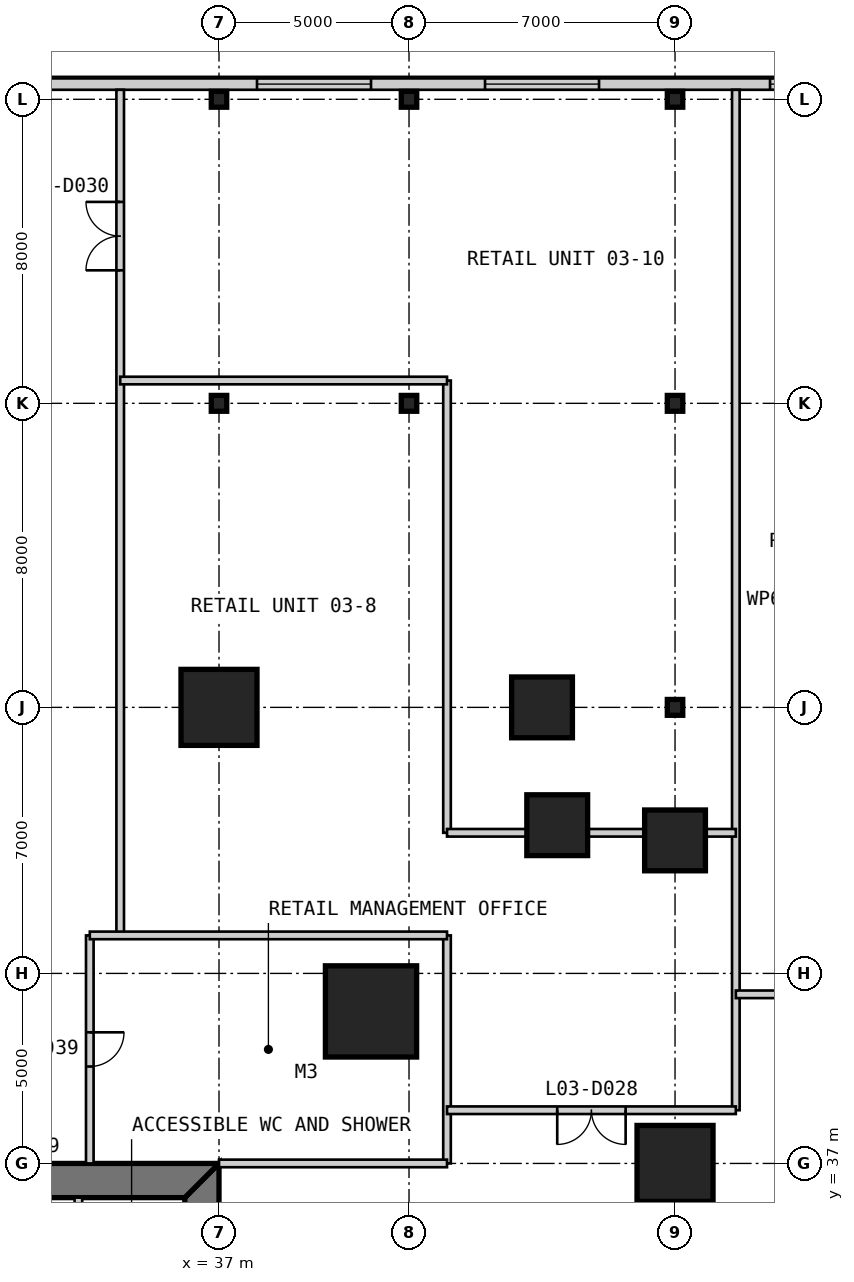
"""IFC4 building model, lengths in metres.
Left out: names, types, materials, properties, quantities, classifications, styles, units other than length and angle.
Written with IfcOpenShell. Run it as: python <this file> out.ifc"""

import sys

from ifc_helpers import new_model, si_unit, direction, frame, frame_2d, origin, origin_2d, place, context, subcontext, project, spatial, polyline, rectangle, i_section, outline, extrude, element, fill, save


model = new_model("IFC4")
c1 = context("Model", 3, precision=1e-05, world=origin(), true_north=direction((0.0, 1.0)))
c2 = subcontext(c1, "Body", "Model", "MODEL_VIEW")
j1 = project(units=[si_unit("LENGTHUNIT", "METRE"), si_unit("PLANEANGLEUNIT", "RADIAN")], contexts=[c1])
p1 = place(None, origin())
s1 = spatial("IfcSite", under=j1, at=p1, CompositionType="ELEMENT")
p2 = place(p1, origin())
s2 = spatial("IfcBuilding", under=s1, at=p2, CompositionType="ELEMENT")
p3 = place(p2, frame((0.0, 0.0, 16.6)))
s3 = spatial("IfcBuildingStorey", under=s2, at=p3, CompositionType="ELEMENT", Elevation=16.6)
p4 = place(p3, frame((41.0, 41.0, 0.0), z_axis=(0.0, 0.0, 1.0), x_axis=(1.0, 0.0, 0.0)))
e1 = element("IfcColumn", 1, at=p4, inside=s3, PredefinedType="COLUMN", context=c2, shape_type="SweptSolid", body=[
    extrude(rectangle(XDim=2.4, YDim=2.4, at=origin_2d()), origin(), (0.0, 0.0, 1.0), 4.8),
])
p5 = place(p3, frame((49.0, 37.0, 0.0), z_axis=(0.0, 0.0, 1.0), x_axis=(1.0, 0.0, 0.0)))
e2 = element("IfcColumn", 2, at=p5, inside=s3, PredefinedType="COLUMN", context=c2, shape_type="SweptSolid", body=[
    extrude(rectangle(XDim=2.0, YDim=2.0, at=origin_2d()), origin(), (0.0, 0.0, 1.0), 4.8),
])
for number, where, z_axis, x_axis in (
    (3, (49.0, 45.5, 0.0), (0.0, 0.0, 1.0), (1.0, 0.0, 0.0)),
    (4, (45.9, 45.9, 0.0), (0.0, 0.0, 1.0), (1.0, 0.0, 0.0)),
    (5, (45.5, 49.0, 0.0), (0.0, 0.0, 1.0), (1.0, 0.0, 0.0)),
):
    element("IfcColumn", number, at=place(p3, frame(where, z_axis=z_axis, x_axis=x_axis)), inside=s3, PredefinedType="COLUMN", context=c2, shape_type="SweptSolid", body=[
        extrude(rectangle(XDim=1.6, YDim=1.6, at=origin_2d()), origin(), (0.0, 0.0, 1.0), 4.8),
    ])
p6 = place(p3, frame((37.0, 49.0, 0.0), z_axis=(0.0, 0.0, 1.0), x_axis=(1.0, 0.0, 0.0)))
e6 = element("IfcColumn", 6, at=p6, inside=s3, PredefinedType="COLUMN", context=c2, shape_type="SweptSolid", body=[
    extrude(rectangle(XDim=2.0, YDim=2.0, at=origin_2d()), origin(), (0.0, 0.0, 1.0), 4.8),
])
for number, where, z_axis, x_axis in (
    (7, (37.0, 57.0, 0.0), (0.0, 0.0, 1.0), (1.0, 0.0, 0.0)),
    (8, (37.0, 65.0, 0.0), (0.0, 0.0, 1.0), (1.0, 0.0, 0.0)),
    (9, (42.0, 57.0, 0.0), (0.0, 0.0, 1.0), (1.0, 0.0, 0.0)),
    (10, (42.0, 65.0, 0.0), (0.0, 0.0, 1.0), (1.0, 0.0, 0.0)),
    (11, (49.0, 49.0, 0.0), (0.0, 0.0, 1.0), (1.0, 0.0, 0.0)),
    (12, (49.0, 57.0, 0.0), (0.0, 0.0, 1.0), (1.0, 0.0, 0.0)),
    (13, (49.0, 65.0, 0.0), (0.0, 0.0, 1.0), (1.0, 0.0, 0.0)),
):
    element("IfcColumn", number, at=place(p3, frame(where, z_axis=z_axis, x_axis=x_axis)), inside=s3, PredefinedType="COLUMN", context=c2, shape_type="SweptSolid", body=[
        extrude(i_section(OverallWidth=0.406, OverallDepth=0.417, WebThickness=0.03, FlangeThickness=0.048, at=origin_2d()), origin(), (0.0, 0.0, 1.0), 4.8),
    ])
p7 = place(p3, frame((36.55, 13.9, 0.0), z_axis=(0.0, 0.0, 1.0), x_axis=(0.0, 1.0, 0.0)))
e14 = element("IfcWall", 14, at=p7, inside=s3, PredefinedType="SHEAR", context=c2, shape_type="SweptSolid", body=[
    extrude(outline(polyline([(-0.9, -0.45), (23.1, -0.45), (22.2, 0.45), (0.0, 0.45), (-0.9, -0.45)])), origin(), (0.0, 0.0, 1.0), 4.8),
])
p8 = place(p7, frame((20.2, 0.0, 0.0)))
e15 = element("IfcOpeningElement", 15, at=p8, cuts=e14, PredefinedType="OPENING", context=c2, shape_type="SweptSolid", body=[
    extrude(rectangle(XDim=1.0, YDim=2.2, at=frame_2d((0.5, 1.1))), frame((0.0, 0.46, 0.0), z_axis=(0.0, -1.0, 0.0), x_axis=(1.0, 0.0, 0.0)), (0.0, 0.0, 1.0), 0.92),
])
p9 = place(p7, frame((17.25, 0.0, 0.0)))
e16 = element("IfcOpeningElement", 16, at=p9, cuts=e14, PredefinedType="OPENING", context=c2, shape_type="SweptSolid", body=[
    extrude(rectangle(XDim=0.9, YDim=2.2, at=frame_2d((0.45, 1.1))), frame((0.0, 0.46, 0.0), z_axis=(0.0, -1.0, 0.0), x_axis=(1.0, 0.0, 0.0)), (0.0, 0.0, 1.0), 0.92),
])
p10 = place(p3, frame((37.0, 36.55, 0.0), z_axis=(0.0, 0.0, 1.0), x_axis=(-1.0, 0.0, 0.0)))
e17 = element("IfcWall", 17, at=p10, inside=s3, PredefinedType="SHEAR", context=c2, shape_type="SweptSolid", body=[
    extrude(outline(polyline([(0.0, -0.45), (24.0, -0.45), (23.1, 0.45), (0.9, 0.45), (0.0, -0.45)])), origin(), (0.0, 0.0, 1.0), 4.8),
])
p11 = place(p10, frame((4.9, 0.0, 0.0)))
e18 = element("IfcOpeningElement", 18, at=p11, cuts=e17, PredefinedType="OPENING", context=c2, shape_type="SweptSolid", body=[
    extrude(rectangle(XDim=1.0, YDim=2.2, at=frame_2d((0.5, 1.1))), frame((0.0, 0.46, 0.0), z_axis=(0.0, -1.0, 0.0), x_axis=(1.0, 0.0, 0.0)), (0.0, 0.0, 1.0), 0.92),
])
p12 = place(p10, frame((8.9, 0.0, 0.0)))
e19 = element("IfcOpeningElement", 19, at=p12, cuts=e17, PredefinedType="OPENING", context=c2, shape_type="SweptSolid", body=[
    extrude(rectangle(XDim=1.1, YDim=2.2, at=frame_2d((0.55, 1.1))), frame((0.0, 0.46, 0.0), z_axis=(0.0, -1.0, 0.0), x_axis=(1.0, 0.0, 0.0)), (0.0, 0.0, 1.0), 0.92),
])
p13 = place(p10, frame((15.05, 0.0, 0.0)))
e20 = element("IfcOpeningElement", 20, at=p13, cuts=e17, PredefinedType="OPENING", context=c2, shape_type="SweptSolid", body=[
    extrude(rectangle(XDim=0.9, YDim=2.2, at=frame_2d((0.45, 1.1))), frame((0.0, 0.46, 0.0), z_axis=(0.0, -1.0, 0.0), x_axis=(1.0, 0.0, 0.0)), (0.0, 0.0, 1.0), 0.92),
])
p14 = place(p10, frame((17.9, 0.0, 0.0)))
e21 = element("IfcOpeningElement", 21, at=p14, cuts=e17, PredefinedType="OPENING", context=c2, shape_type="SweptSolid", body=[
    extrude(rectangle(XDim=1.0, YDim=2.2, at=frame_2d((0.5, 1.1))), frame((0.0, 0.46, 0.0), z_axis=(0.0, -1.0, 0.0), x_axis=(1.0, 0.0, 0.0)), (0.0, 0.0, 1.0), 0.92),
])
p15 = place(p10, frame((21.4, 0.0, 0.0)))
e22 = element("IfcOpeningElement", 22, at=p15, cuts=e17, PredefinedType="OPENING", context=c2, shape_type="SweptSolid", body=[
    extrude(rectangle(XDim=1.0, YDim=2.2, at=frame_2d((0.5, 1.1))), frame((0.0, 0.46, 0.0), z_axis=(0.0, -1.0, 0.0), x_axis=(1.0, 0.0, 0.0)), (0.0, 0.0, 1.0), 0.92),
])
p16 = place(p3, frame((57.55, 65.4, 0.0), z_axis=(0.0, 0.0, 1.0), x_axis=(-1.0, 0.0, 0.0)))
e23 = element("IfcWall", 23, at=p16, inside=s3, PredefinedType="SOLIDWALL", context=c2, shape_type="SweptSolid", body=[
    extrude(rectangle(XDim=73.1, YDim=0.3, at=frame_2d((36.55, 0.0))), origin(), (0.0, 0.0, 1.0), 4.5),
])
p17 = place(p16, frame((67.05, 0.0, 0.9)))
e24 = element("IfcOpeningElement", 24, at=p17, cuts=e23, PredefinedType="OPENING", context=c2, shape_type="SweptSolid", body=[
    extrude(rectangle(XDim=3.0, YDim=2.4, at=frame_2d((1.5, 1.2))), frame((0.0, 0.16, 0.0), z_axis=(0.0, -1.0, 0.0), x_axis=(1.0, 0.0, 0.0)), (0.0, 0.0, 1.0), 0.32),
])
p18 = place(p16, frame((59.05, 0.0, 0.9)))
e25 = element("IfcOpeningElement", 25, at=p18, cuts=e23, PredefinedType="OPENING", context=c2, shape_type="SweptSolid", body=[
    extrude(rectangle(XDim=3.0, YDim=2.4, at=frame_2d((1.5, 1.2))), frame((0.0, 0.16, 0.0), z_axis=(0.0, -1.0, 0.0), x_axis=(1.0, 0.0, 0.0)), (0.0, 0.0, 1.0), 0.32),
])
p19 = place(p16, frame((51.05, 0.0, 0.9)))
e26 = element("IfcOpeningElement", 26, at=p19, cuts=e23, PredefinedType="OPENING", context=c2, shape_type="SweptSolid", body=[
    extrude(rectangle(XDim=3.0, YDim=2.4, at=frame_2d((1.5, 1.2))), frame((0.0, 0.16, 0.0), z_axis=(0.0, -1.0, 0.0), x_axis=(1.0, 0.0, 0.0)), (0.0, 0.0, 1.0), 0.32),
])
p20 = place(p16, frame((37.05, 0.0, 0.9)))
e27 = element("IfcOpeningElement", 27, at=p20, cuts=e23, PredefinedType="OPENING", context=c2, shape_type="SweptSolid", body=[
    extrude(rectangle(XDim=3.0, YDim=2.4, at=frame_2d((1.5, 1.2))), frame((0.0, 0.16, 0.0), z_axis=(0.0, -1.0, 0.0), x_axis=(1.0, 0.0, 0.0)), (0.0, 0.0, 1.0), 0.32),
])
p21 = place(p16, frame((25.05, 0.0, 0.9)))
e28 = element("IfcOpeningElement", 28, at=p21, cuts=e23, PredefinedType="OPENING", context=c2, shape_type="SweptSolid", body=[
    extrude(rectangle(XDim=3.0, YDim=2.4, at=frame_2d((1.5, 1.2))), frame((0.0, 0.16, 0.0), z_axis=(0.0, -1.0, 0.0), x_axis=(1.0, 0.0, 0.0)), (0.0, 0.0, 1.0), 0.32),
])
p22 = place(p16, frame((16.55, 0.0, 0.9)))
e29 = element("IfcOpeningElement", 29, at=p22, cuts=e23, PredefinedType="OPENING", context=c2, shape_type="SweptSolid", body=[
    extrude(rectangle(XDim=3.0, YDim=2.4, at=frame_2d((1.5, 1.2))), frame((0.0, 0.16, 0.0), z_axis=(0.0, -1.0, 0.0), x_axis=(1.0, 0.0, 0.0)), (0.0, 0.0, 1.0), 0.32),
])
p23 = place(p16, frame((10.55, 0.0, 0.9)))
e30 = element("IfcOpeningElement", 30, at=p23, cuts=e23, PredefinedType="OPENING", context=c2, shape_type="SweptSolid", body=[
    extrude(rectangle(XDim=3.0, YDim=2.4, at=frame_2d((1.5, 1.2))), frame((0.0, 0.16, 0.0), z_axis=(0.0, -1.0, 0.0), x_axis=(1.0, 0.0, 0.0)), (0.0, 0.0, 1.0), 0.32),
])
p24 = place(p16, frame((3.05, 0.0, 0.9)))
e31 = element("IfcOpeningElement", 31, at=p24, cuts=e23, PredefinedType="OPENING", context=c2, shape_type="SweptSolid", body=[
    extrude(rectangle(XDim=3.0, YDim=2.4, at=frame_2d((1.5, 1.2))), frame((0.0, 0.16, 0.0), z_axis=(0.0, -1.0, 0.0), x_axis=(1.0, 0.0, 0.0)), (0.0, 0.0, 1.0), 0.32),
])
p25 = place(p3, frame((33.3, 36.1, 0.0), z_axis=(0.0, 0.0, 1.0), x_axis=(0.0, -1.0, 0.0)))
e32 = element("IfcWall", 32, at=p25, inside=s3, PredefinedType="PARTITIONING", context=c2, shape_type="SweptSolid", body=[
    extrude(rectangle(XDim=16.1, YDim=0.2, at=frame_2d((8.05, 0.0))), origin(), (0.0, 0.0, 1.0), 4.6),
])
p26 = place(p3, frame((33.6, 37.0, 0.0), z_axis=(0.0, 0.0, 1.0), x_axis=(0.0, 1.0, 0.0)))
e33 = element("IfcWall", 33, at=p26, inside=s3, PredefinedType="PARTITIONING", context=c2, shape_type="SweptSolid", body=[
    extrude(rectangle(XDim=6.0, YDim=0.2, at=frame_2d((3.0, 0.0))), origin(), (0.0, 0.0, 1.0), 4.5),
])
p27 = place(p26, frame((2.55, 0.0, 0.0)))
e34 = element("IfcOpeningElement", 34, at=p27, cuts=e33, PredefinedType="OPENING", context=c2, shape_type="SweptSolid", body=[
    extrude(rectangle(XDim=0.9, YDim=2.2, at=frame_2d((0.45, 1.1))), frame((0.0, 0.11, 0.0), z_axis=(0.0, -1.0, 0.0), x_axis=(1.0, 0.0, 0.0)), (0.0, 0.0, 1.0), 0.22),
])
p28 = place(p3, frame((34.4, 43.0, 0.0), z_axis=(0.0, 0.0, 1.0), x_axis=(0.0, 1.0, 0.0)))
e35 = element("IfcWall", 35, at=p28, inside=s3, PredefinedType="PARTITIONING", context=c2, shape_type="SweptSolid", body=[
    extrude(rectangle(XDim=22.25, YDim=0.2, at=frame_2d((11.125, 0.0))), origin(), (0.0, 0.0, 1.0), 4.5),
])
p29 = place(p28, frame((17.5, 0.0, 0.0)))
e36 = element("IfcOpeningElement", 36, at=p29, cuts=e35, PredefinedType="OPENING", context=c2, shape_type="SweptSolid", body=[
    extrude(rectangle(XDim=1.8, YDim=2.4, at=frame_2d((0.9, 1.2))), frame((0.0, 0.11, 0.0), z_axis=(0.0, -1.0, 0.0), x_axis=(1.0, 0.0, 0.0)), (0.0, 0.0, 1.0), 0.22),
])
p30 = place(p3, frame((43.0, 37.0, 0.0), z_axis=(0.0, 0.0, 1.0), x_axis=(0.0, 1.0, 0.0)))
e37 = element("IfcWall", 37, at=p30, inside=s3, PredefinedType="PARTITIONING", context=c2, shape_type="SweptSolid", body=[
    extrude(rectangle(XDim=6.0, YDim=0.2, at=frame_2d((3.0, 0.0))), origin(), (0.0, 0.0, 1.0), 4.5),
])
p31 = place(p3, frame((43.0, 45.7, 0.0), z_axis=(0.0, 0.0, 1.0), x_axis=(0.0, 1.0, 0.0)))
e38 = element("IfcWall", 38, at=p31, inside=s3, PredefinedType="PARTITIONING", context=c2, shape_type="SweptSolid", body=[
    extrude(rectangle(XDim=11.9, YDim=0.2, at=frame_2d((5.95, 0.0))), origin(), (0.0, 0.0, 1.0), 4.5),
])
p32 = place(p3, frame((50.6, 38.4, 0.0), z_axis=(0.0, 0.0, 1.0), x_axis=(0.0, 1.0, 0.0)))
e39 = element("IfcWall", 39, at=p32, inside=s3, PredefinedType="PARTITIONING", context=c2, shape_type="SweptSolid", body=[
    extrude(rectangle(XDim=26.85, YDim=0.2, at=frame_2d((13.425, 0.0))), origin(), (0.0, 0.0, 1.0), 4.5),
])
p33 = place(p3, frame((37.0, 37.0, 0.0), z_axis=(0.0, 0.0, 1.0), x_axis=(1.0, 0.0, 0.0)))
e40 = element("IfcWall", 40, at=p33, inside=s3, PredefinedType="PARTITIONING", context=c2, shape_type="SweptSolid", body=[
    extrude(rectangle(XDim=6.0, YDim=0.2, at=frame_2d((3.0, 0.0))), origin(), (0.0, 0.0, 1.0), 3.653),
])
p34 = place(p3, frame((43.0, 38.4, 0.0), z_axis=(0.0, 0.0, 1.0), x_axis=(1.0, 0.0, 0.0)))
e41 = element("IfcWall", 41, at=p34, inside=s3, PredefinedType="PARTITIONING", context=c2, shape_type="SweptSolid", body=[
    extrude(rectangle(XDim=7.6, YDim=0.2, at=frame_2d((3.8, 0.0))), origin(), (0.0, 0.0, 1.0), 4.5),
])
p35 = place(p34, frame((2.9, 0.0, 0.0)))
e42 = element("IfcOpeningElement", 42, at=p35, cuts=e41, PredefinedType="OPENING", context=c2, shape_type="SweptSolid", body=[
    extrude(rectangle(XDim=1.8, YDim=2.4, at=frame_2d((0.9, 1.2))), frame((0.0, 0.11, 0.0), z_axis=(0.0, -1.0, 0.0), x_axis=(1.0, 0.0, 0.0)), (0.0, 0.0, 1.0), 0.22),
])
p36 = place(p3, frame((50.6, 41.45, 0.0), z_axis=(0.0, 0.0, 1.0), x_axis=(1.0, 0.0, 0.0)))
e43 = element("IfcWall", 43, at=p36, inside=s3, PredefinedType="PARTITIONING", context=c2, shape_type="SweptSolid", body=[
    extrude(rectangle(XDim=6.65, YDim=0.2, at=frame_2d((3.325, 0.0))), origin(), (0.0, 0.0, 1.0), 4.5),
])
p37 = place(p36, frame((2.425, 0.0, 0.0)))
e44 = element("IfcOpeningElement", 44, at=p37, cuts=e43, PredefinedType="OPENING", context=c2, shape_type="SweptSolid", body=[
    extrude(rectangle(XDim=1.8, YDim=2.4, at=frame_2d((0.9, 1.2))), frame((0.0, 0.11, 0.0), z_axis=(0.0, -1.0, 0.0), x_axis=(1.0, 0.0, 0.0)), (0.0, 0.0, 1.0), 0.22),
])
p38 = place(p3, frame((33.6, 43.0, 0.0), z_axis=(0.0, 0.0, 1.0), x_axis=(1.0, 0.0, 0.0)))
e45 = element("IfcWall", 45, at=p38, inside=s3, PredefinedType="PARTITIONING", context=c2, shape_type="SweptSolid", body=[
    extrude(rectangle(XDim=9.4, YDim=0.2, at=frame_2d((4.7, 0.0))), origin(), (0.0, 0.0, 1.0), 4.5),
])
p39 = place(p3, frame((43.0, 45.7, 0.0), z_axis=(0.0, 0.0, 1.0), x_axis=(1.0, 0.0, 0.0)))
e46 = element("IfcWall", 46, at=p39, inside=s3, PredefinedType="PARTITIONING", context=c2, shape_type="SweptSolid", body=[
    extrude(rectangle(XDim=2.1, YDim=0.2, at=frame_2d((1.05, 0.0))), origin(), (0.0, 0.0, 1.0), 4.5),
])
p40 = place(p3, frame((46.7, 45.7, 0.0), z_axis=(0.0, 0.0, 1.0), x_axis=(1.0, 0.0, 0.0)))
e47 = element("IfcWall", 47, at=p40, inside=s3, PredefinedType="PARTITIONING", context=c2, shape_type="SweptSolid", body=[
    extrude(rectangle(XDim=1.5, YDim=0.2, at=frame_2d((0.75, 0.0))), origin(), (0.0, 0.0, 1.0), 3.65),
])
p41 = place(p3, frame((49.8, 45.7, 0.0), z_axis=(0.0, 0.0, 1.0), x_axis=(1.0, 0.0, 0.0)))
e48 = element("IfcWall", 48, at=p41, inside=s3, PredefinedType="PARTITIONING", context=c2, shape_type="SweptSolid", body=[
    extrude(rectangle(XDim=0.8, YDim=0.2, at=frame_2d((0.4, 0.0))), origin(), (0.0, 0.0, 1.0), 4.5),
])
p42 = place(p3, frame((34.4, 57.6, 0.0), z_axis=(0.0, 0.0, 1.0), x_axis=(1.0, 0.0, 0.0)))
e49 = element("IfcWall", 49, at=p42, inside=s3, PredefinedType="PARTITIONING", context=c2, shape_type="SweptSolid", body=[
    extrude(rectangle(XDim=8.6, YDim=0.2, at=frame_2d((4.3, 0.0))), origin(), (0.0, 0.0, 1.0), 4.5),
])
p43 = place(p22, origin())
e50 = element("IfcWindow", 50, at=p43, inside=s3, PartitioningType="SINGLE_PANEL", PredefinedType="WINDOW", context=c2, shape_type="SweptSolid", body=[
    extrude(rectangle(XDim=3.0, YDim=2.4, at=frame_2d((1.5, 1.2))), frame((0.0, 0.03, 0.0), z_axis=(0.0, -1.0, 0.0), x_axis=(1.0, 0.0, 0.0)), (0.0, 0.0, 1.0), 0.06),
])
fill(e29, e50)
p44 = place(p23, origin())
e51 = element("IfcWindow", 51, at=p44, inside=s3, PartitioningType="SINGLE_PANEL", PredefinedType="WINDOW", context=c2, shape_type="SweptSolid", body=[
    extrude(rectangle(XDim=3.0, YDim=2.4, at=frame_2d((1.5, 1.2))), frame((0.0, 0.03, 0.0), z_axis=(0.0, -1.0, 0.0), x_axis=(1.0, 0.0, 0.0)), (0.0, 0.0, 1.0), 0.06),
])
fill(e30, e51)
p45 = place(p24, origin())
e52 = element("IfcWindow", 52, at=p45, inside=s3, PartitioningType="SINGLE_PANEL", PredefinedType="WINDOW", context=c2, shape_type="SweptSolid", body=[
    extrude(rectangle(XDim=3.0, YDim=2.4, at=frame_2d((1.5, 1.2))), frame((0.0, 0.03, 0.0), z_axis=(0.0, -1.0, 0.0), x_axis=(1.0, 0.0, 0.0)), (0.0, 0.0, 1.0), 0.06),
])
fill(e31, e52)
p46 = place(p35, frame((1.8, 0.0, 0.0), z_axis=(0.0, 0.0, 1.0), x_axis=(-1.0, 0.0, 0.0)))
e53 = element("IfcDoor", 53, at=p46, inside=s3, OperationType="DOUBLE_DOOR_SINGLE_SWING", PredefinedType="DOOR", context=c2, shape_type="SweptSolid", body=[
    extrude(rectangle(XDim=1.8, YDim=2.4, at=frame_2d((0.9, 1.2))), frame((0.0, 0.025, 0.0), z_axis=(0.0, -1.0, 0.0), x_axis=(1.0, 0.0, 0.0)), (0.0, 0.0, 1.0), 0.05),
])
fill(e42, e53)
p47 = place(p29, origin())
e54 = element("IfcDoor", 54, at=p47, inside=s3, OperationType="DOUBLE_DOOR_SINGLE_SWING", PredefinedType="DOOR", context=c2, shape_type="SweptSolid", body=[
    extrude(rectangle(XDim=1.8, YDim=2.4, at=frame_2d((0.9, 1.2))), frame((0.0, 0.025, 0.0), z_axis=(0.0, -1.0, 0.0), x_axis=(1.0, 0.0, 0.0)), (0.0, 0.0, 1.0), 0.05),
])
fill(e36, e54)
p48 = place(p27, frame((0.9, 0.0, 0.0), z_axis=(0.0, 0.0, 1.0), x_axis=(-1.0, 0.0, 0.0)))
e55 = element("IfcDoor", 55, at=p48, inside=s3, OperationType="SINGLE_SWING_LEFT", PredefinedType="DOOR", context=c2, shape_type="SweptSolid", body=[
    extrude(rectangle(XDim=0.9, YDim=2.2, at=frame_2d((0.45, 1.1))), frame((0.0, 0.025, 0.0), z_axis=(0.0, -1.0, 0.0), x_axis=(1.0, 0.0, 0.0)), (0.0, 0.0, 1.0), 0.05),
])
fill(e34, e55)
save(model, sys.argv[1])
